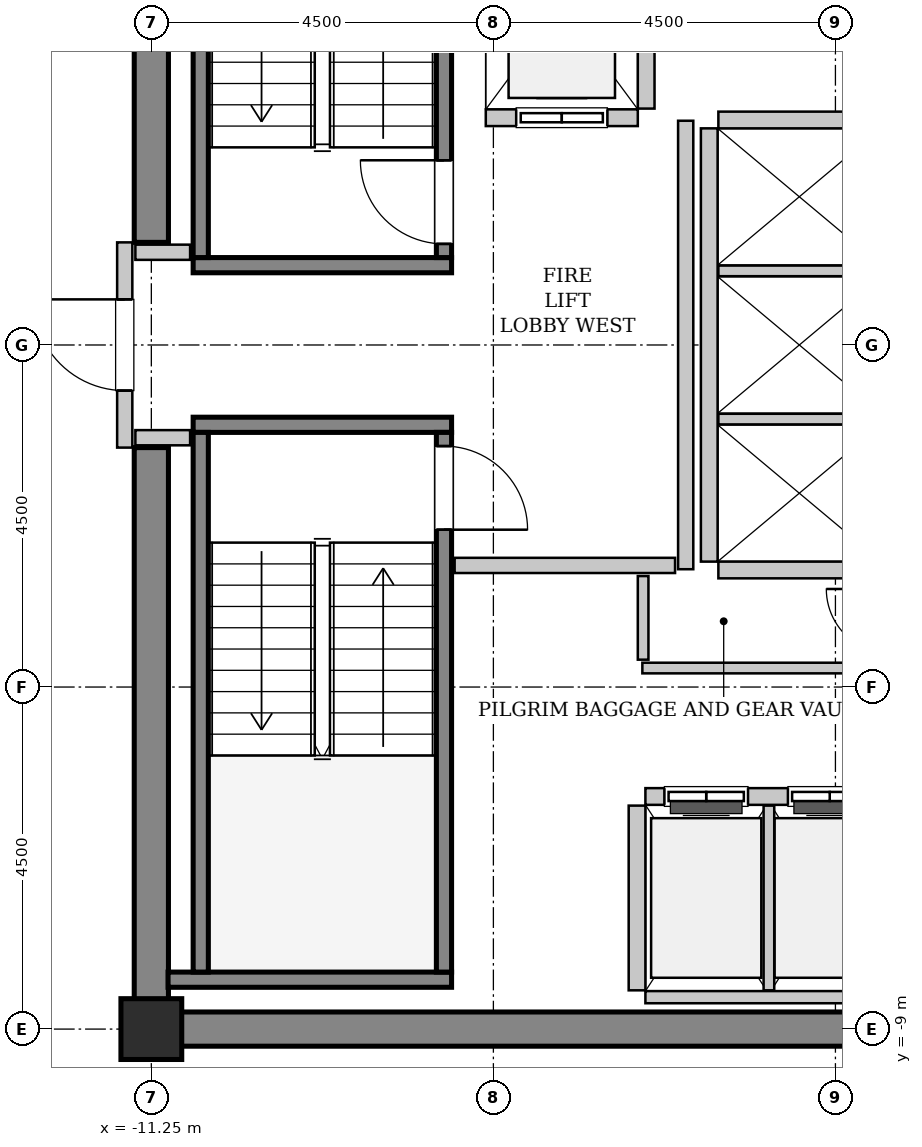
"""IFC4 building model, lengths in metres.
Left out: names, types, materials, properties, quantities, classifications, styles, units other than length and angle.
Written with IfcOpenShell. Run it as: python <this file> out.ifc"""

import sys

from ifc_helpers import new_model, si_unit, direction, frame, frame_2d, origin, origin_2d, place, context, subcontext, project, spatial, rectangle, hollow_rectangle, extrude, source, transform, mapped, element, fill, save


model = new_model("IFC4")
c1 = context("Model", 3, precision=1e-05, world=origin(), true_north=direction((0.0, 1.0)))
c2 = subcontext(c1, "Body", "Model", "MODEL_VIEW")
j1 = project(units=[si_unit("LENGTHUNIT", "METRE"), si_unit("PLANEANGLEUNIT", "RADIAN")], contexts=[c1])
p1 = place(None, origin())
s1 = spatial("IfcSite", under=j1, at=p1, CompositionType="ELEMENT")
p2 = place(p1, origin())
s2 = spatial("IfcBuilding", under=s1, at=p2, CompositionType="ELEMENT")
p3 = place(p2, frame((0.0, 0.0, 240.8)))
s3 = spatial("IfcBuildingStorey", under=s2, at=p3, CompositionType="ELEMENT", Elevation=240.8)
m1 = source(origin(), c2, "Body", "SweptSolid", [
    extrude(rectangle(XDim=9.925, YDim=0.45, at=frame_2d((4.962, 0.0))), origin(), (0.0, 0.0, 1.0), 3.8),
])
p4 = place(p3, frame((-11.475, -9.0, 0.0), z_axis=(0.0, 0.0, 1.0), x_axis=(1.0, 0.0, 0.0)))
e1 = element("IfcWall", 1, at=p4, inside=s3, PredefinedType="SHEAR", context=c2, shape_type="MappedRepresentation", body=[
    mapped(m1, transform((0.0, 0.0, 0.0), x_axis=(1.0, 0.0, 0.0), y_axis=(0.0, 1.0, 0.0), z_axis=(0.0, 0.0, 1.0), scale=1.0)),
])
m2 = source(origin(), c2, "Body", "SweptSolid", [
    extrude(rectangle(XDim=7.425, YDim=0.45, at=frame_2d((3.712, 0.0))), origin(), (0.0, 0.0, 1.0), 3.8),
])
for number, where, z_axis, x_axis in (
    (2, (-11.25, -8.775, 0.0), (0.0, 0.0, 1.0), (0.0, 1.0, 0.0)),
    (3, (-11.25, 1.35, 0.0), (0.0, 0.0, 1.0), (0.0, 1.0, 0.0)),
):
    element("IfcWall", number, at=place(p3, frame(where, z_axis=z_axis, x_axis=x_axis)), inside=s3, PredefinedType="SHEAR", context=c2, shape_type="MappedRepresentation", body=[
        mapped(m2, transform((0.0, 0.0, 0.0), x_axis=(1.0, 0.0, 0.0), y_axis=(0.0, 1.0, 0.0), z_axis=(0.0, 0.0, 1.0), scale=1.0)),
    ])
m3 = source(origin(), c2, "Body", "SweptSolid", [
    extrude(hollow_rectangle(XDim=0.8, YDim=0.8, WallThickness=0.04, InnerFilletRadius=0.04, OuterFilletRadius=0.08, at=origin_2d()), origin(), (0.0, 0.0, 1.0), 3.8),
])
p5 = place(p3, frame((-11.25, -9.0, 0.0), z_axis=(0.0, 0.0, 1.0), x_axis=(1.0, 0.0, 0.0)))
e4 = element("IfcColumn", 4, at=p5, inside=s3, PredefinedType="COLUMN", context=c2, shape_type="MappedRepresentation", body=[
    mapped(m3, transform((0.0, 0.0, 0.0), x_axis=(1.0, 0.0, 0.0), y_axis=(0.0, 1.0, 0.0), z_axis=(0.0, 0.0, 1.0), scale=1.0)),
])
m4 = source(origin(), c2, "Body", "SweptSolid", [
    extrude(rectangle(XDim=3.4, YDim=0.2, at=frame_2d((1.7, 0.0))), origin(), (0.0, 0.0, 1.0), 3.8),
])
p6 = place(p3, frame((-7.3, 1.05, 0.0), z_axis=(0.0, 0.0, 1.0), x_axis=(-1.0, 0.0, 0.0)))
e5 = element("IfcWall", 5, at=p6, inside=s3, PredefinedType="SOLIDWALL", context=c2, shape_type="MappedRepresentation", body=[
    mapped(m4, transform((0.0, 0.0, 0.0), x_axis=(1.0, 0.0, 0.0), y_axis=(0.0, 1.0, 0.0), z_axis=(0.0, 0.0, 1.0), scale=1.0)),
])
m5 = source(origin(), c2, "Body", "SweptSolid", [
    extrude(rectangle(XDim=7.1, YDim=0.2, at=frame_2d((3.55, 0.0))), origin(), (0.0, 0.0, 1.0), 3.8),
])
p7 = place(p3, frame((-7.4, 1.15, 0.0), z_axis=(0.0, 0.0, 1.0), x_axis=(0.0, 1.0, 0.0)))
e6 = element("IfcWall", 6, at=p7, inside=s3, PredefinedType="SOLIDWALL", context=c2, shape_type="MappedRepresentation", body=[
    mapped(m5, transform((0.0, 0.0, 0.0), x_axis=(1.0, 0.0, 0.0), y_axis=(0.0, 1.0, 0.0), z_axis=(0.0, 0.0, 1.0), scale=1.0)),
])
p8 = place(p7, frame((0.18, 0.0, 0.0)))
e7 = element("IfcOpeningElement", 7, at=p8, cuts=e6, PredefinedType="OPENING", context=c2, shape_type="SweptSolid", body=[
    extrude(rectangle(XDim=1.1, YDim=2.15, at=frame_2d((0.55, 1.075))), frame((0.0, 0.11, 0.0), z_axis=(0.0, -1.0, 0.0), x_axis=(1.0, 0.0, 0.0)), (0.0, 0.0, 1.0), 0.22),
])
p9 = place(p3, frame((-10.6, 1.15, 0.0), z_axis=(0.0, 0.0, 1.0), x_axis=(0.0, 1.0, 0.0)))
e8 = element("IfcWall", 8, at=p9, inside=s3, PredefinedType="SOLIDWALL", context=c2, shape_type="MappedRepresentation", body=[
    mapped(m5, transform((0.0, 0.0, 0.0), x_axis=(1.0, 0.0, 0.0), y_axis=(0.0, 1.0, 0.0), z_axis=(0.0, 0.0, 1.0), scale=1.0)),
])
p10 = place(p3, frame((-10.7, -1.05, 0.0), z_axis=(0.0, 0.0, 1.0), x_axis=(1.0, 0.0, 0.0)))
e9 = element("IfcWall", 9, at=p10, inside=s3, PredefinedType="SOLIDWALL", context=c2, shape_type="MappedRepresentation", body=[
    mapped(m4, transform((0.0, 0.0, 0.0), x_axis=(1.0, 0.0, 0.0), y_axis=(0.0, 1.0, 0.0), z_axis=(0.0, 0.0, 1.0), scale=1.0)),
])
m6 = source(origin(), c2, "Body", "SweptSolid", [
    extrude(rectangle(XDim=3.73, YDim=0.2, at=frame_2d((1.865, 0.0))), origin(), (0.0, 0.0, 1.0), 3.8),
])
p11 = place(p3, frame((-11.03, -8.35, 0.0), z_axis=(0.0, 0.0, 1.0), x_axis=(1.0, 0.0, 0.0)))
e10 = element("IfcWall", 10, at=p11, inside=s3, PredefinedType="SOLIDWALL", context=c2, shape_type="MappedRepresentation", body=[
    mapped(m6, transform((0.0, 0.0, 0.0), x_axis=(1.0, 0.0, 0.0), y_axis=(0.0, 1.0, 0.0), z_axis=(0.0, 0.0, 1.0), scale=1.0)),
])
p12 = place(p3, frame((-10.6, -1.15, 0.0), z_axis=(0.0, 0.0, 1.0), x_axis=(0.0, -1.0, 0.0)))
e11 = element("IfcWall", 11, at=p12, inside=s3, PredefinedType="SOLIDWALL", context=c2, shape_type="MappedRepresentation", body=[
    mapped(m5, transform((0.0, 0.0, 0.0), x_axis=(1.0, 0.0, 0.0), y_axis=(0.0, 1.0, 0.0), z_axis=(0.0, 0.0, 1.0), scale=1.0)),
])
p13 = place(p3, frame((-7.4, -1.15, 0.0), z_axis=(0.0, 0.0, 1.0), x_axis=(0.0, -1.0, 0.0)))
e12 = element("IfcWall", 12, at=p13, inside=s3, PredefinedType="SOLIDWALL", context=c2, shape_type="MappedRepresentation", body=[
    mapped(m5, transform((0.0, 0.0, 0.0), x_axis=(1.0, 0.0, 0.0), y_axis=(0.0, 1.0, 0.0), z_axis=(0.0, 0.0, 1.0), scale=1.0)),
])
p14 = place(p13, frame((0.18, 0.0, 0.0)))
e13 = element("IfcOpeningElement", 13, at=p14, cuts=e12, PredefinedType="OPENING", context=c2, shape_type="SweptSolid", body=[
    extrude(rectangle(XDim=1.1, YDim=2.15, at=frame_2d((0.55, 1.075))), frame((0.0, 0.11, 0.0), z_axis=(0.0, -1.0, 0.0), x_axis=(1.0, 0.0, 0.0)), (0.0, 0.0, 1.0), 0.22),
])
m7 = source(origin(), c2, "Body", "SweptSolid", [
    extrude(rectangle(XDim=2.0, YDim=0.22, at=frame_2d((1.0, 0.0))), origin(), (0.0, 0.0, 1.0), 3.535),
])
p15 = place(p3, frame((-6.85, 2.99, 0.0), z_axis=(0.0, 0.0, 1.0), x_axis=(1.0, 0.0, 0.0)))
e14 = element("IfcWall", 14, at=p15, inside=s3, PredefinedType="SOLIDWALL", context=c2, shape_type="MappedRepresentation", body=[
    mapped(m7, transform((0.0, 0.0, 0.0), x_axis=(1.0, 0.0, 0.0), y_axis=(0.0, 1.0, 0.0), z_axis=(0.0, 0.0, 1.0), scale=1.0)),
])
p16 = place(p15, frame((0.4, 0.0, 0.0)))
e15 = element("IfcOpeningElement", 15, at=p16, cuts=e14, PredefinedType="OPENING", context=c2, shape_type="SweptSolid", body=[
    extrude(rectangle(XDim=1.2, YDim=2.2, at=frame_2d((0.6, 1.1))), frame((0.0, 0.12, 0.0), z_axis=(0.0, -1.0, 0.0), x_axis=(1.0, 0.0, 0.0)), (0.0, 0.0, 1.0), 0.24),
])
m8 = source(origin(), c2, "Body", "SweptSolid", [
    extrude(rectangle(XDim=2.68, YDim=0.22, at=frame_2d((1.34, 0.0))), origin(), (0.0, 0.0, 1.0), 3.535),
])
p17 = place(p3, frame((-4.74, 3.11, 0.0), z_axis=(0.0, 0.0, 1.0), x_axis=(0.0, 1.0, 0.0)))
e16 = element("IfcWall", 16, at=p17, inside=s3, PredefinedType="SOLIDWALL", context=c2, shape_type="MappedRepresentation", body=[
    mapped(m8, transform((0.0, 0.0, 0.0), x_axis=(1.0, 0.0, 0.0), y_axis=(0.0, 1.0, 0.0), z_axis=(0.0, 0.0, 1.0), scale=1.0)),
])
m9 = source(origin(), c2, "Body", "SweptSolid", [
    extrude(rectangle(XDim=3.2, YDim=0.22, at=frame_2d((1.6, 0.0))), origin(), (0.0, 0.0, 1.0), 3.535),
])
p18 = place(p3, frame((-1.55, -5.94, 0.0), z_axis=(0.0, 0.0, 1.0), x_axis=(-1.0, 0.0, 0.0)))
e17 = element("IfcWall", 17, at=p18, inside=s3, PredefinedType="SOLIDWALL", context=c2, shape_type="MappedRepresentation", body=[
    mapped(m9, transform((0.0, 0.0, 0.0), x_axis=(1.0, 0.0, 0.0), y_axis=(0.0, 1.0, 0.0), z_axis=(0.0, 0.0, 1.0), scale=1.0)),
])
p19 = place(p18, frame((1.85, 0.0, 0.0)))
e18 = element("IfcOpeningElement", 18, at=p19, cuts=e17, PredefinedType="OPENING", context=c2, shape_type="SweptSolid", body=[
    extrude(rectangle(XDim=1.1, YDim=2.2, at=frame_2d((0.55, 1.1))), frame((0.0, 0.12, 0.0), z_axis=(0.0, -1.0, 0.0), x_axis=(1.0, 0.0, 0.0)), (0.0, 0.0, 1.0), 0.24),
])
p20 = place(p18, frame((0.225, 0.0, 0.0)))
e19 = element("IfcOpeningElement", 19, at=p20, cuts=e17, PredefinedType="OPENING", context=c2, shape_type="SweptSolid", body=[
    extrude(rectangle(XDim=1.1, YDim=2.2, at=frame_2d((0.55, 1.1))), frame((0.0, 0.12, 0.0), z_axis=(0.0, -1.0, 0.0), x_axis=(1.0, 0.0, 0.0)), (0.0, 0.0, 1.0), 0.24),
])
m10 = source(origin(), c2, "Body", "SweptSolid", [
    extrude(rectangle(XDim=3.2, YDim=0.16, at=frame_2d((1.6, 0.0))), origin(), (0.0, 0.0, 1.0), 2.625),
])
p21 = place(p3, frame((-4.75, -8.58, 0.0), z_axis=(0.0, 0.0, 1.0), x_axis=(1.0, 0.0, 0.0)))
e20 = element("IfcWall", 20, at=p21, inside=s3, PredefinedType="PARTITIONING", context=c2, shape_type="MappedRepresentation", body=[
    mapped(m10, transform((0.0, 0.0, 0.0), x_axis=(1.0, 0.0, 0.0), y_axis=(0.0, 1.0, 0.0), z_axis=(0.0, 0.0, 1.0), scale=1.0)),
])
m11 = source(origin(), c2, "Body", "SweptSolid", [
    extrude(rectangle(XDim=2.43, YDim=0.22, at=frame_2d((1.215, 0.0))), origin(), (0.0, 0.0, 1.0), 3.535),
])
p22 = place(p3, frame((-4.86, -6.06, 0.0), z_axis=(0.0, 0.0, 1.0), x_axis=(0.0, -1.0, 0.0)))
e21 = element("IfcWall", 21, at=p22, inside=s3, PredefinedType="SOLIDWALL", context=c2, shape_type="MappedRepresentation", body=[
    mapped(m11, transform((0.0, 0.0, 0.0), x_axis=(1.0, 0.0, 0.0), y_axis=(0.0, 1.0, 0.0), z_axis=(0.0, 0.0, 1.0), scale=1.0)),
])
m12 = source(origin(), c2, "Body", "SweptSolid", [
    extrude(rectangle(XDim=2.43, YDim=0.14, at=frame_2d((1.215, 0.0))), origin(), (0.0, 0.0, 1.0), 3.535),
])
p23 = place(p3, frame((-3.125, -8.49, 0.0), z_axis=(0.0, 0.0, 1.0), x_axis=(0.0, 1.0, 0.0)))
e22 = element("IfcWall", 22, at=p23, inside=s3, PredefinedType="PARTITIONING", context=c2, shape_type="MappedRepresentation", body=[
    mapped(m12, transform((0.0, 0.0, 0.0), x_axis=(1.0, 0.0, 0.0), y_axis=(0.0, 1.0, 0.0), z_axis=(0.0, 0.0, 1.0), scale=1.0)),
])
m13 = source(origin(), c2, "Body", "SweptSolid", [
    extrude(rectangle(XDim=5.7, YDim=0.22, at=frame_2d((2.85, 0.0))), origin(), (0.0, 0.0, 1.0), 3.535),
])
p24 = place(p3, frame((-3.91, 2.85, 0.0), z_axis=(0.0, 0.0, 1.0), x_axis=(0.0, -1.0, 0.0)))
e23 = element("IfcWall", 23, at=p24, inside=s3, PredefinedType="SOLIDWALL", context=c2, shape_type="MappedRepresentation", body=[
    mapped(m13, transform((0.0, 0.0, 0.0), x_axis=(1.0, 0.0, 0.0), y_axis=(0.0, 1.0, 0.0), z_axis=(0.0, 0.0, 1.0), scale=1.0)),
])
m14 = source(origin(), c2, "Body", "SweptSolid", [
    extrude(rectangle(XDim=2.13, YDim=0.22, at=frame_2d((1.065, 0.0))), origin(), (0.0, 0.0, 1.0), 3.535),
])
p25 = place(p3, frame((-3.79, -2.96, 0.0), z_axis=(0.0, 0.0, 1.0), x_axis=(1.0, 0.0, 0.0)))
e24 = element("IfcWall", 24, at=p25, inside=s3, PredefinedType="SOLIDWALL", context=c2, shape_type="MappedRepresentation", body=[
    mapped(m14, transform((0.0, 0.0, 0.0), x_axis=(1.0, 0.0, 0.0), y_axis=(0.0, 1.0, 0.0), z_axis=(0.0, 0.0, 1.0), scale=1.0)),
])
m15 = source(origin(), c2, "Body", "SweptSolid", [
    extrude(rectangle(XDim=2.13, YDim=0.14, at=frame_2d((1.065, 0.0))), origin(), (0.0, 0.0, 1.0), 3.535),
])
for number, where, z_axis, x_axis in (
    (25, (-3.79, -0.975, 0.0), (0.0, 0.0, 1.0), (1.0, 0.0, 0.0)),
    (26, (-3.79, 0.975, 0.0), (0.0, 0.0, 1.0), (1.0, 0.0, 0.0)),
):
    element("IfcWall", number, at=place(p3, frame(where, z_axis=z_axis, x_axis=x_axis)), inside=s3, PredefinedType="PARTITIONING", context=c2, shape_type="MappedRepresentation", body=[
        mapped(m15, transform((0.0, 0.0, 0.0), x_axis=(1.0, 0.0, 0.0), y_axis=(0.0, 1.0, 0.0), z_axis=(0.0, 0.0, 1.0), scale=1.0)),
    ])
p26 = place(p3, frame((-1.66, 2.96, 0.0), z_axis=(0.0, 0.0, 1.0), x_axis=(-1.0, 0.0, 0.0)))
e27 = element("IfcWall", 27, at=p26, inside=s3, PredefinedType="SOLIDWALL", context=c2, shape_type="MappedRepresentation", body=[
    mapped(m14, transform((0.0, 0.0, 0.0), x_axis=(1.0, 0.0, 0.0), y_axis=(0.0, 1.0, 0.0), z_axis=(0.0, 0.0, 1.0), scale=1.0)),
])
m16 = source(origin(), c2, "Body", "SweptSolid", [
    extrude(rectangle(XDim=2.7, YDim=0.2, at=frame_2d((1.35, 0.0))), origin(), (0.0, 0.0, 1.0), 2.625),
])
p27 = place(p3, frame((-11.6, -1.35, 0.0), z_axis=(0.0, 0.0, 1.0), x_axis=(0.0, 1.0, 0.0)))
e28 = element("IfcWall", 28, at=p27, inside=s3, PredefinedType="PARTITIONING", context=c2, shape_type="MappedRepresentation", body=[
    mapped(m16, transform((0.0, 0.0, 0.0), x_axis=(1.0, 0.0, 0.0), y_axis=(0.0, 1.0, 0.0), z_axis=(0.0, 0.0, 1.0), scale=1.0)),
])
p28 = place(p27, frame((0.75, 0.0, 0.0)))
e29 = element("IfcOpeningElement", 29, at=p28, cuts=e28, PredefinedType="OPENING", context=c2, shape_type="SweptSolid", body=[
    extrude(rectangle(XDim=1.2, YDim=2.15, at=frame_2d((0.6, 1.075))), frame((0.0, 0.11, 0.0), z_axis=(0.0, -1.0, 0.0), x_axis=(1.0, 0.0, 0.0)), (0.0, 0.0, 1.0), 0.22),
])
m17 = source(origin(), c2, "Body", "SweptSolid", [
    extrude(rectangle(XDim=5.9, YDim=0.2, at=frame_2d((2.95, 0.0))), origin(), (0.0, 0.0, 1.0), 3.535),
])
p29 = place(p3, frame((-4.22, -2.95, 0.0), z_axis=(0.0, 0.0, 1.0), x_axis=(0.0, 1.0, 0.0)))
e30 = element("IfcWall", 30, at=p29, inside=s3, PredefinedType="PARTITIONING", context=c2, shape_type="MappedRepresentation", body=[
    mapped(m17, transform((0.0, 0.0, 0.0), x_axis=(1.0, 0.0, 0.0), y_axis=(0.0, 1.0, 0.0), z_axis=(0.0, 0.0, 1.0), scale=1.0)),
])
m18 = source(origin(), c2, "Body", "SweptSolid", [
    extrude(rectangle(XDim=2.9, YDim=0.2, at=frame_2d((1.45, 0.0))), origin(), (0.0, 0.0, 1.0), 3.535),
])
p30 = place(p3, frame((-7.26, -2.9, 0.0), z_axis=(0.0, 0.0, 1.0), x_axis=(1.0, 0.0, 0.0)))
e31 = element("IfcWall", 31, at=p30, inside=s3, PredefinedType="PARTITIONING", context=c2, shape_type="MappedRepresentation", body=[
    mapped(m18, transform((0.0, 0.0, 0.0), x_axis=(1.0, 0.0, 0.0), y_axis=(0.0, 1.0, 0.0), z_axis=(0.0, 0.0, 1.0), scale=1.0)),
])
m19 = source(origin(), c2, "Body", "SweptSolid", [
    extrude(rectangle(XDim=0.72, YDim=0.2, at=frame_2d((0.36, 0.0))), origin(), (0.0, 0.0, 1.0), 3.535),
])
for number, where, z_axis, x_axis in (
    (32, (-11.46, 1.22, 0.0), (0.0, 0.0, 1.0), (1.0, 0.0, 0.0)),
    (33, (-11.46, -1.22, 0.0), (0.0, 0.0, 1.0), (1.0, 0.0, 0.0)),
):
    element("IfcWall", number, at=place(p3, frame(where, z_axis=z_axis, x_axis=x_axis)), inside=s3, PredefinedType="PARTITIONING", context=c2, shape_type="MappedRepresentation", body=[
        mapped(m19, transform((0.0, 0.0, 0.0), x_axis=(1.0, 0.0, 0.0), y_axis=(0.0, 1.0, 0.0), z_axis=(0.0, 0.0, 1.0), scale=1.0)),
    ])
m20 = source(origin(), c2, "Body", "SweptSolid", [
    extrude(rectangle(XDim=3.15, YDim=0.14, at=frame_2d((1.575, 0.0))), origin(), (0.0, 0.0, 1.0), 3.535),
])
p31 = place(p3, frame((-4.79, -4.25, 0.0), z_axis=(0.0, 0.0, 1.0), x_axis=(1.0, 0.0, 0.0)))
e34 = element("IfcWall", 34, at=p31, inside=s3, PredefinedType="PARTITIONING", context=c2, shape_type="MappedRepresentation", body=[
    mapped(m20, transform((0.0, 0.0, 0.0), x_axis=(1.0, 0.0, 0.0), y_axis=(0.0, 1.0, 0.0), z_axis=(0.0, 0.0, 1.0), scale=1.0)),
])
m21 = source(origin(), c2, "Body", "SweptSolid", [
    extrude(rectangle(XDim=1.1, YDim=0.14, at=frame_2d((0.55, 0.0))), origin(), (0.0, 0.0, 1.0), 3.535),
])
p32 = place(p3, frame((-4.78, -4.14, 0.0), z_axis=(0.0, 0.0, 1.0), x_axis=(0.0, 1.0, 0.0)))
e35 = element("IfcWall", 35, at=p32, inside=s3, PredefinedType="PARTITIONING", context=c2, shape_type="MappedRepresentation", body=[
    mapped(m21, transform((0.0, 0.0, 0.0), x_axis=(1.0, 0.0, 0.0), y_axis=(0.0, 1.0, 0.0), z_axis=(0.0, 0.0, 1.0), scale=1.0)),
])
m22 = source(origin(), c2, "Body", "SweptSolid", [
    extrude(rectangle(XDim=1.1, YDim=2.15, at=frame_2d((0.55, 1.075))), frame((0.0, 0.025, 0.0), z_axis=(0.0, -1.0, 0.0), x_axis=(1.0, 0.0, 0.0)), (0.0, 0.0, 1.0), 0.05),
])
p33 = place(p8, origin())
e36 = element("IfcDoor", 36, at=p33, inside=s3, OperationType="SINGLE_SWING_RIGHT", PredefinedType="DOOR", context=c2, shape_type="MappedRepresentation", body=[
    mapped(m22, transform((0.0, 0.0, 0.0), x_axis=(1.0, 0.0, 0.0), y_axis=(0.0, 1.0, 0.0), z_axis=(0.0, 0.0, 1.0), scale=1.0)),
])
fill(e7, e36)
p34 = place(p14, origin())
e37 = element("IfcDoor", 37, at=p34, inside=s3, OperationType="SINGLE_SWING_RIGHT", PredefinedType="DOOR", context=c2, shape_type="MappedRepresentation", body=[
    mapped(m22, transform((0.0, 0.0, 0.0), x_axis=(1.0, 0.0, 0.0), y_axis=(0.0, 1.0, 0.0), z_axis=(0.0, 0.0, 1.0), scale=1.0)),
])
fill(e13, e37)
m23 = source(origin(), c2, "Body", "SweptSolid", [
    extrude(rectangle(XDim=1.2, YDim=2.2, at=frame_2d((0.6, 1.1))), frame((0.0, 0.025, 0.0), z_axis=(0.0, -1.0, 0.0), x_axis=(1.0, 0.0, 0.0)), (0.0, 0.0, 1.0), 0.05),
])
p35 = place(p16, origin())
e38 = element("IfcDoor", 38, at=p35, inside=s3, OperationType="SLIDING_TO_LEFT", PredefinedType="DOOR", context=c2, shape_type="MappedRepresentation", body=[
    mapped(m23, transform((0.0, 0.0, 0.0), x_axis=(1.0, 0.0, 0.0), y_axis=(0.0, 1.0, 0.0), z_axis=(0.0, 0.0, 1.0), scale=1.0)),
])
fill(e15, e38)
m24 = source(origin(), c2, "Body", "SweptSolid", [
    extrude(rectangle(XDim=1.1, YDim=2.2, at=frame_2d((0.55, 1.1))), frame((0.0, 0.025, 0.0), z_axis=(0.0, -1.0, 0.0), x_axis=(1.0, 0.0, 0.0)), (0.0, 0.0, 1.0), 0.05),
])
p36 = place(p19, origin())
e39 = element("IfcDoor", 39, at=p36, inside=s3, OperationType="DOUBLE_DOOR_SLIDING", PredefinedType="DOOR", context=c2, shape_type="MappedRepresentation", body=[
    mapped(m24, transform((0.0, 0.0, 0.0), x_axis=(1.0, 0.0, 0.0), y_axis=(0.0, 1.0, 0.0), z_axis=(0.0, 0.0, 1.0), scale=1.0)),
])
fill(e18, e39)
p37 = place(p20, origin())
e40 = element("IfcDoor", 40, at=p37, inside=s3, OperationType="DOUBLE_DOOR_SLIDING", PredefinedType="DOOR", context=c2, shape_type="MappedRepresentation", body=[
    mapped(m24, transform((0.0, 0.0, 0.0), x_axis=(1.0, 0.0, 0.0), y_axis=(0.0, 1.0, 0.0), z_axis=(0.0, 0.0, 1.0), scale=1.0)),
])
fill(e19, e40)
m25 = source(origin(), c2, "Body", "SweptSolid", [
    extrude(rectangle(XDim=1.2, YDim=2.15, at=frame_2d((0.6, 1.075))), frame((0.0, 0.025, 0.0), z_axis=(0.0, -1.0, 0.0), x_axis=(1.0, 0.0, 0.0)), (0.0, 0.0, 1.0), 0.05),
])
p38 = place(p28, origin())
e41 = element("IfcDoor", 41, at=p38, inside=s3, OperationType="SINGLE_SWING_RIGHT", PredefinedType="DOOR", context=c2, shape_type="MappedRepresentation", body=[
    mapped(m25, transform((0.0, 0.0, 0.0), x_axis=(1.0, 0.0, 0.0), y_axis=(0.0, 1.0, 0.0), z_axis=(0.0, 0.0, 1.0), scale=1.0)),
])
fill(e29, e41)
save(model, sys.argv[1])
